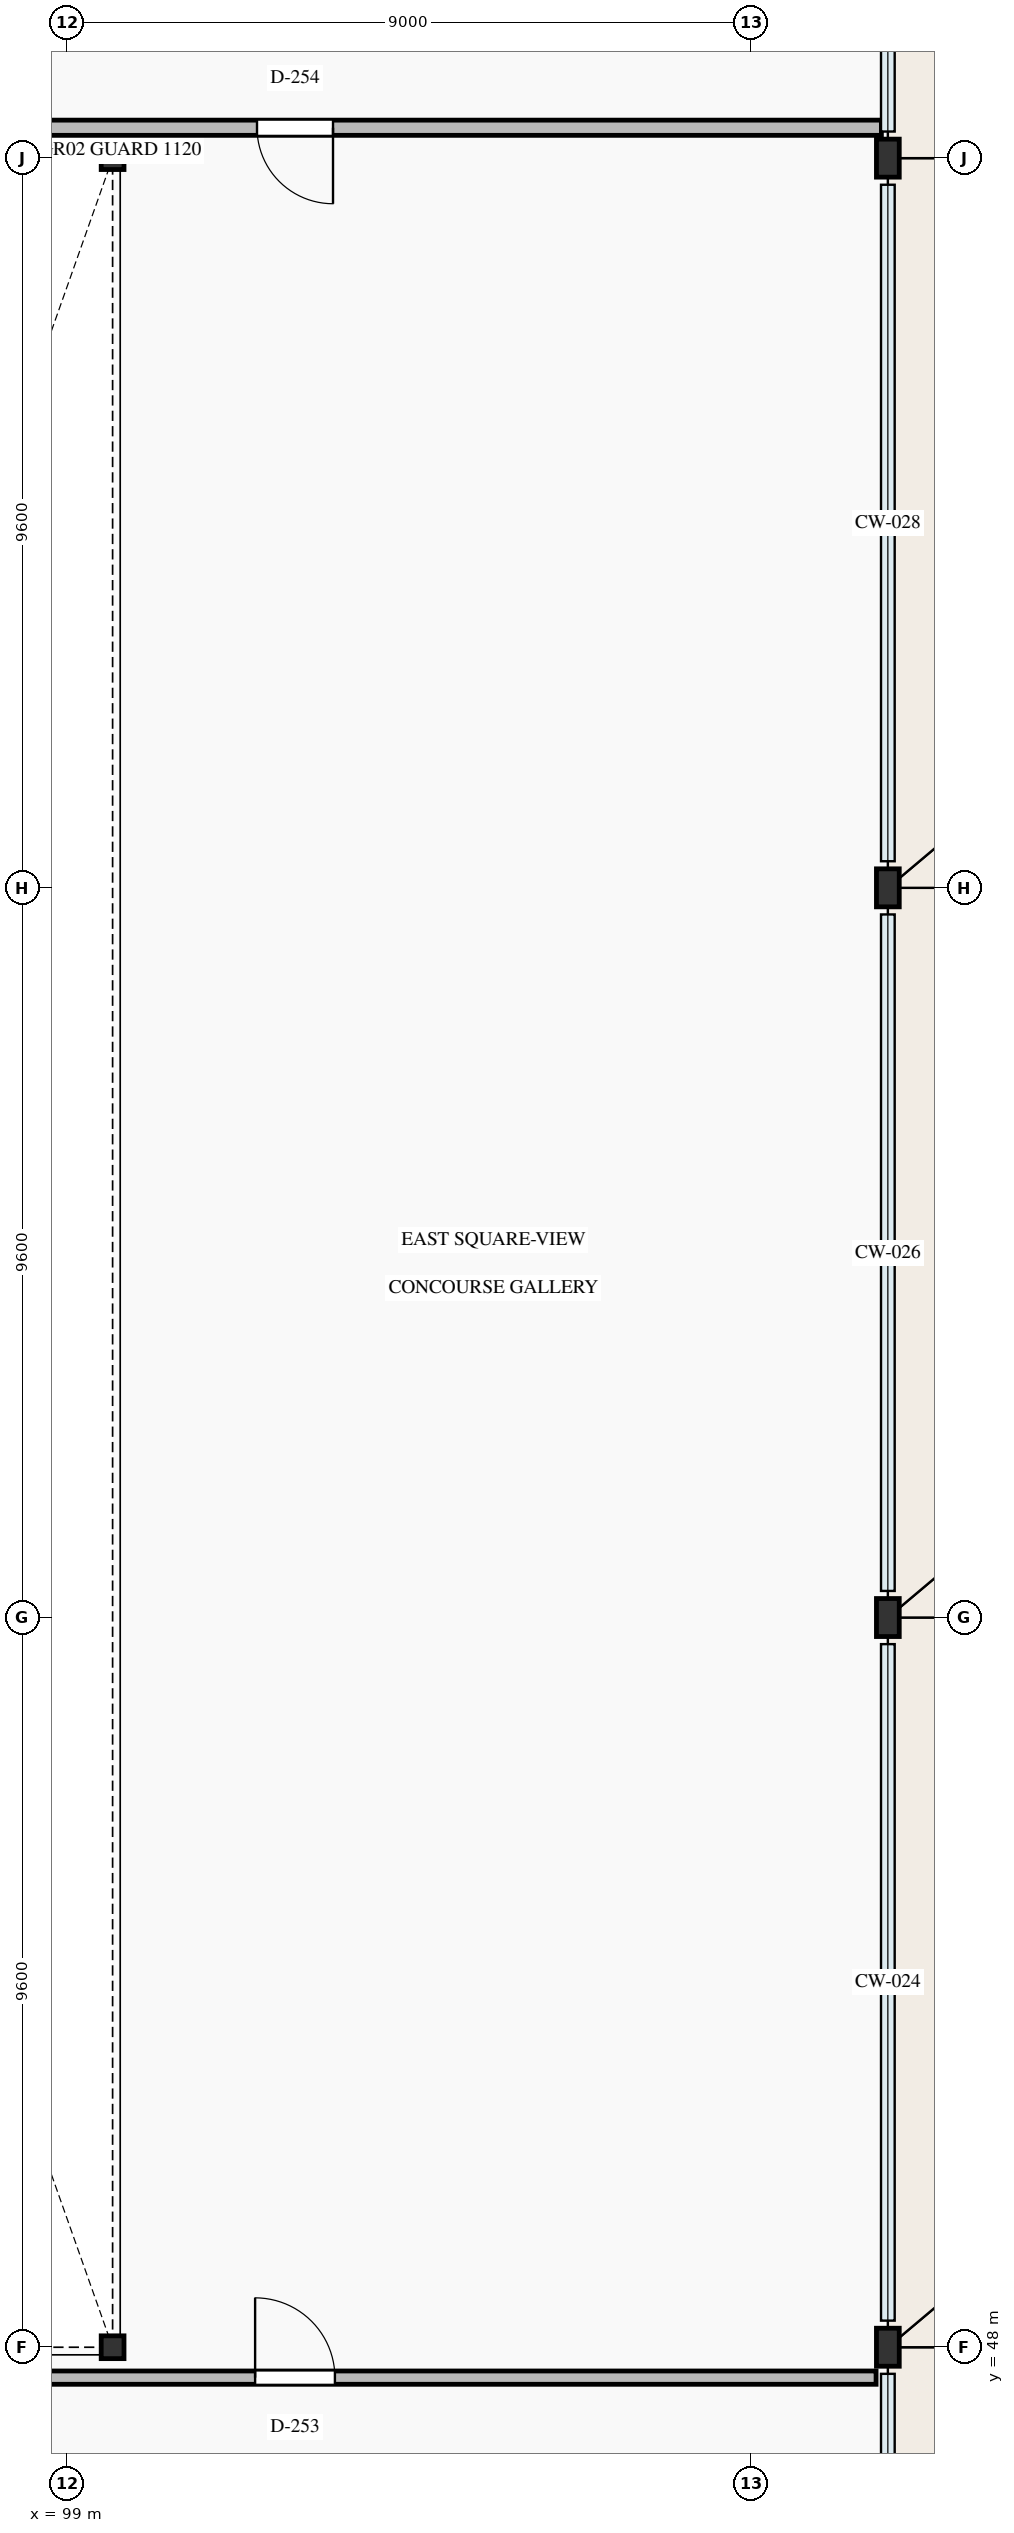
"""IFC4 building model, lengths in metres.
Left out: names, types, materials, properties, quantities, classifications, styles, units other than length and angle.
Written with IfcOpenShell. Run it as: python <this file> out.ifc"""

import sys

from ifc_helpers import new_model, si_unit, direction, frame, frame_2d, origin, origin_2d, place, context, subcontext, project, spatial, rectangle, i_section, extrude, element, fill, save


model = new_model("IFC4")
c1 = context("Model", 3, precision=1e-05, world=origin(), true_north=direction((0.0, 1.0)))
c2 = subcontext(c1, "Body", "Model", "MODEL_VIEW")
j1 = project(units=[si_unit("LENGTHUNIT", "METRE"), si_unit("PLANEANGLEUNIT", "RADIAN")], contexts=[c1])
p1 = place(None, origin())
s1 = spatial("IfcSite", under=j1, at=p1, CompositionType="ELEMENT")
p2 = place(p1, origin())
s2 = spatial("IfcBuilding", under=s1, at=p2, CompositionType="ELEMENT")
p3 = place(p2, frame((0.0, 0.0, 10.8)))
s3 = spatial("IfcBuildingStorey", under=s2, at=p3, CompositionType="ELEMENT", Elevation=10.8)
for number, where, z_axis, x_axis in (
    (1, (109.8, 48.0, 0.0), (0.0, 0.0, 1.0), (1.0, 0.0, 0.0)),
    (2, (109.8, 57.6, 0.0), (0.0, 0.0, 1.0), (1.0, 0.0, 0.0)),
    (3, (109.8, 67.2, 0.0), (0.0, 0.0, 1.0), (1.0, 0.0, 0.0)),
    (4, (109.8, 76.8, 0.0), (0.0, 0.0, 1.0), (1.0, 0.0, 0.0)),
):
    element("IfcColumn", number, at=place(p3, frame(where, z_axis=z_axis, x_axis=x_axis)), inside=s3, PredefinedType="COLUMN", context=c2, shape_type="SweptSolid", body=[
        extrude(i_section(OverallWidth=0.3, OverallDepth=0.5, WebThickness=0.014, FlangeThickness=0.028, FilletRadius=0.027, at=origin_2d()), origin(), (0.0, 0.0, 1.0), 4.2),
    ])
for number, where, z_axis, x_axis in (
    (5, (99.6, 48.0, 0.0), (0.0, 0.0, 1.0), (1.0, 0.0, 0.0)),
    (6, (99.6, 76.8, 0.0), (0.0, 0.0, 1.0), (1.0, 0.0, 0.0)),
):
    element("IfcColumn", number, at=place(p3, frame(where, z_axis=z_axis, x_axis=x_axis)), inside=s3, PredefinedType="COLUMN", context=c2, shape_type="SweptSolid", body=[
        extrude(i_section(OverallWidth=0.3, OverallDepth=0.3, WebThickness=0.011, FlangeThickness=0.019, FilletRadius=0.027, at=origin_2d()), origin(), (0.0, 0.0, 1.0), 4.2),
    ])
p4 = place(p3, frame((89.15, 47.6, 0.0), z_axis=(0.0, 0.0, 1.0), x_axis=(1.0, 0.0, 0.0)))
e7 = element("IfcWall", 7, at=p4, inside=s3, PredefinedType="PARTITIONING", context=c2, shape_type="SweptSolid", body=[
    extrude(rectangle(XDim=20.495, YDim=0.175, at=frame_2d((10.248, 0.0))), origin(), (0.0, 0.0, 1.0), 3.94),
])
p5 = place(p4, frame((12.325, 0.0, 0.0)))
e8 = element("IfcOpeningElement", 8, at=p5, cuts=e7, PredefinedType="OPENING", context=c2, shape_type="SweptSolid", body=[
    extrude(rectangle(XDim=1.05, YDim=2.2, at=frame_2d((0.525, 1.1))), frame((0.0, 0.103, 0.0), z_axis=(0.0, -1.0, 0.0), x_axis=(1.0, 0.0, 0.0)), (0.0, 0.0, 1.0), 0.205),
])
p6 = place(p3, frame((89.15, 77.2, 0.0), z_axis=(0.0, 0.0, 1.0), x_axis=(1.0, 0.0, 0.0)))
e9 = element("IfcWall", 9, at=p6, inside=s3, PredefinedType="PARTITIONING", context=c2, shape_type="SweptSolid", body=[
    extrude(rectangle(XDim=20.565, YDim=0.2, at=frame_2d((10.283, 0.0))), origin(), (0.0, 0.0, 1.0), 3.94),
])
p7 = place(p6, frame((12.35, 0.0, 0.0)))
e10 = element("IfcOpeningElement", 10, at=p7, cuts=e9, PredefinedType="OPENING", context=c2, shape_type="SweptSolid", body=[
    extrude(rectangle(XDim=1.0, YDim=2.15, at=frame_2d((0.5, 1.075))), frame((0.0, 0.115, 0.0), z_axis=(0.0, -1.0, 0.0), x_axis=(1.0, 0.0, 0.0)), (0.0, 0.0, 1.0), 0.23),
])
p8 = place(p5, origin())
e11 = element("IfcDoor", 11, at=p8, inside=s3, OperationType="SINGLE_SWING_LEFT", PredefinedType="DOOR", context=c2, shape_type="SweptSolid", body=[
    extrude(rectangle(XDim=1.05, YDim=2.2, at=frame_2d((0.525, 1.1))), frame((0.0, 0.025, 0.0), z_axis=(0.0, -1.0, 0.0), x_axis=(1.0, 0.0, 0.0)), (0.0, 0.0, 1.0), 0.05),
])
fill(e8, e11)
p9 = place(p7, frame((1.0, 0.0, 0.0), z_axis=(0.0, 0.0, 1.0), x_axis=(-1.0, 0.0, 0.0)))
e12 = element("IfcDoor", 12, at=p9, inside=s3, OperationType="SINGLE_SWING_RIGHT", PredefinedType="DOOR", context=c2, shape_type="SweptSolid", body=[
    extrude(rectangle(XDim=1.0, YDim=2.15, at=frame_2d((0.5, 1.075))), frame((0.0, 0.025, 0.0), z_axis=(0.0, -1.0, 0.0), x_axis=(1.0, 0.0, 0.0)), (0.0, 0.0, 1.0), 0.05),
])
fill(e10, e12)
save(model, sys.argv[1])
